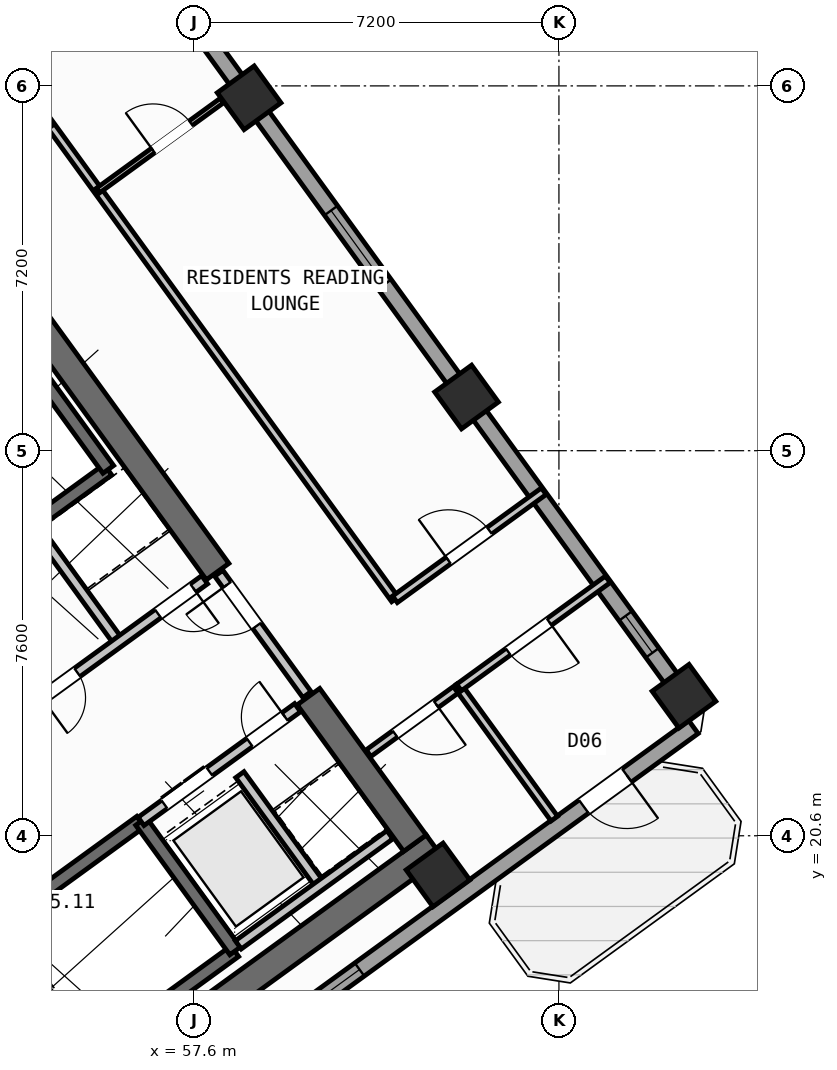
"""IFC4 building model, lengths in metres.
Left out: names, types, materials, properties, quantities, classifications, styles, units other than length and angle.
Written with IfcOpenShell. Run it as: python <this file> out.ifc"""

import sys

from ifc_helpers import new_model, si_unit, direction, frame, frame_2d, origin, origin_2d, place, context, subcontext, project, spatial, rectangle, hollow_rectangle, extrude, source, transform, mapped, element, fill, save


model = new_model("IFC4")
c1 = context("Model", 3, precision=1e-05, world=origin(), true_north=direction((0.0, 1.0)))
c2 = subcontext(c1, "Body", "Model", "MODEL_VIEW")
j1 = project(units=[si_unit("LENGTHUNIT", "METRE"), si_unit("PLANEANGLEUNIT", "RADIAN")], contexts=[c1])
p1 = place(None, origin())
s1 = spatial("IfcSite", under=j1, at=p1, CompositionType="ELEMENT")
p2 = place(p1, origin())
s2 = spatial("IfcBuilding", under=s1, at=p2, CompositionType="ELEMENT")
p3 = place(p2, frame((0.0, 0.0, 108.9)))
s3 = spatial("IfcBuildingStorey", under=s2, at=p3, CompositionType="ELEMENT", Elevation=108.9)
p4 = place(p3, frame((52.359, 13.14, 0.0), z_axis=(0.0, 0.0, 1.0), x_axis=(0.809014896919, 0.587788139183, 0.0)))
e1 = element("IfcWall", 1, at=p4, inside=s3, PredefinedType="SHEAR", context=c2, shape_type="SweptSolid", body=[
    extrude(rectangle(XDim=12.34, YDim=0.55, at=frame_2d((6.17, 0.0))), origin(), (0.0, 0.0, 1.0), 3.35),
])
p5 = place(p3, frame((61.958, 20.454, 0.0), z_axis=(0.0, 0.0, 1.0), x_axis=(-0.587802113096, 0.809004744015, 0.0)))
e2 = element("IfcWall", 2, at=p5, inside=s3, PredefinedType="SHEAR", context=c2, shape_type="SweptSolid", body=[
    extrude(rectangle(XDim=3.575, YDim=0.55, at=frame_2d((1.788, 0.0))), origin(), (0.0, 0.0, 1.0), 3.35),
])
p6 = place(p3, frame((58.064, 25.813, 0.0), z_axis=(0.0, 0.0, 1.0), x_axis=(-0.587764933797, 0.809031756236, 0.0)))
e3 = element("IfcWall", 3, at=p6, inside=s3, PredefinedType="SHEAR", context=c2, shape_type="SweptSolid", body=[
    extrude(rectangle(XDim=6.425, YDim=0.55, at=frame_2d((3.212, 0.0))), origin(), (0.0, 0.0, 1.0), 3.35),
])
m1 = source(origin(), c2, "Body", "SweptSolid", [
    extrude(hollow_rectangle(XDim=0.9, YDim=0.9, WallThickness=0.036, at=origin_2d()), origin(), (0.0, 0.0, 1.0), 3.6),
])
for number, where, z_axis, x_axis in (
    (4, (62.414, 19.827, 0.0), (0.0, 0.0, 1.0), (0.809, 0.588, 0.0)),
    (5, (67.268, 23.354, 0.0), (0.0, 0.0, 1.0), (0.809, 0.588, 0.0)),
    (6, (62.977, 29.259, 0.0), (0.0, 0.0, 1.0), (0.809, 0.588, 0.0)),
    (7, (58.686, 35.165, 0.0), (0.0, 0.0, 1.0), (0.809, 0.588, 0.0)),
):
    element("IfcColumn", number, at=place(p3, frame(where, z_axis=z_axis, x_axis=x_axis)), inside=s3, PredefinedType="COLUMN", context=c2, shape_type="MappedRepresentation", body=[
        mapped(m1, transform((0.0, 0.0, 0.0), scale=1.0)),
    ])
p7 = place(p3, frame((54.81, 40.5, 0.0), z_axis=(0.0, 0.0, 1.0), x_axis=(0.587783625747, -0.809018176127, 0.0)))
e8 = element("IfcWall", 8, at=p7, inside=s3, PredefinedType="STANDARD", context=c2, shape_type="SweptSolid", body=[
    extrude(rectangle(XDim=21.587, YDim=0.32, at=frame_2d((10.794, 0.0))), origin(), (0.0, 0.0, 1.0), 2.775),
])
p8 = place(p7, frame((2.381, 0.0, 0.8)))
e9 = element("IfcOpeningElement", 9, at=p8, cuts=e8, PredefinedType="OPENING", context=c2, shape_type="SweptSolid", body=[
    extrude(rectangle(XDim=2.1, YDim=1.55, at=frame_2d((1.05, 0.775))), frame((0.0, 0.17, 0.0), z_axis=(0.0, -1.0, 0.0), x_axis=(1.0, 0.0, 0.0)), (0.0, 0.0, 1.0), 0.34),
])
p9 = place(p7, frame((9.344, 0.0, 0.85)))
e10 = element("IfcOpeningElement", 10, at=p9, cuts=e8, PredefinedType="OPENING", context=c2, shape_type="SweptSolid", body=[
    extrude(rectangle(XDim=1.8, YDim=1.5, at=frame_2d((0.9, 0.75))), frame((0.0, 0.17, 0.0), z_axis=(0.0, -1.0, 0.0), x_axis=(1.0, 0.0, 0.0)), (0.0, 0.0, 1.0), 0.34),
])
p10 = place(p7, frame((19.234, 0.0, 1.0)))
e11 = element("IfcOpeningElement", 11, at=p10, cuts=e8, PredefinedType="OPENING", context=c2, shape_type="SweptSolid", body=[
    extrude(rectangle(XDim=0.9, YDim=1.25, at=frame_2d((0.45, 0.625))), frame((0.0, 0.17, 0.0), z_axis=(0.0, -1.0, 0.0), x_axis=(1.0, 0.0, 0.0)), (0.0, 0.0, 1.0), 0.34),
])
p11 = place(p3, frame((67.454, 22.747, 0.0), z_axis=(0.0, 0.0, 1.0), x_axis=(-0.809021120468, -0.587779573171, 0.0)))
e12 = element("IfcWall", 12, at=p11, inside=s3, PredefinedType="STANDARD", context=c2, shape_type="SweptSolid", body=[
    extrude(rectangle(XDim=17.588, YDim=0.32, at=frame_2d((8.794, 0.0))), origin(), (0.0, 0.0, 1.0), 3.35),
])
p12 = place(p11, frame((1.624, 0.0, 0.0)))
e13 = element("IfcOpeningElement", 13, at=p12, cuts=e12, PredefinedType="OPENING", context=c2, shape_type="SweptSolid", body=[
    extrude(rectangle(XDim=1.05, YDim=2.15, at=frame_2d((0.525, 1.075))), frame((0.0, 0.17, 0.0), z_axis=(0.0, -1.0, 0.0), x_axis=(1.0, 0.0, 0.0)), (0.0, 0.0, 1.0), 0.34),
])
p13 = place(p11, frame((8.144, 0.0, 0.8)))
e14 = element("IfcOpeningElement", 14, at=p13, cuts=e12, PredefinedType="OPENING", context=c2, shape_type="SweptSolid", body=[
    extrude(rectangle(XDim=2.1, YDim=1.55, at=frame_2d((1.05, 0.775))), frame((0.0, 0.17, 0.0), z_axis=(0.0, -1.0, 0.0), x_axis=(1.0, 0.0, 0.0)), (0.0, 0.0, 1.0), 0.34),
])
p14 = place(p11, frame((13.344, 0.0, 0.8)))
e15 = element("IfcOpeningElement", 15, at=p14, cuts=e12, PredefinedType="OPENING", context=c2, shape_type="SweptSolid", body=[
    extrude(rectangle(XDim=2.1, YDim=1.55, at=frame_2d((1.05, 0.775))), frame((0.0, 0.17, 0.0), z_axis=(0.0, -1.0, 0.0), x_axis=(1.0, 0.0, 0.0)), (0.0, 0.0, 1.0), 0.34),
])
p15 = place(p3, frame((49.863, 23.44, 0.0), z_axis=(0.0, 0.0, 1.0), x_axis=(0.809003474932, 0.587803859759, 0.0)))
e16 = element("IfcWall", 16, at=p15, inside=s3, PredefinedType="SHEAR", context=c2, shape_type="SweptSolid", body=[
    extrude(rectangle(XDim=7.46, YDim=0.26, at=frame_2d((3.73, 0.0))), origin(), (0.0, 0.0, 1.0), 3.35),
])
p16 = place(p15, frame((0.36, 0.0, 0.0)))
e17 = element("IfcOpeningElement", 17, at=p16, cuts=e16, PredefinedType="OPENING", context=c2, shape_type="SweptSolid", body=[
    extrude(rectangle(XDim=0.86, YDim=2.05, at=frame_2d((0.43, 1.025))), frame((0.0, 0.14, 0.0), z_axis=(0.0, -1.0, 0.0), x_axis=(1.0, 0.0, 0.0)), (0.0, 0.0, 1.0), 0.28),
])
p17 = place(p3, frame((55.906, 27.831, 0.0), z_axis=(0.0, 0.0, 1.0), x_axis=(-0.587804123638, 0.809003283204, 0.0)))
e18 = element("IfcWall", 18, at=p17, inside=s3, PredefinedType="SHEAR", context=c2, shape_type="SweptSolid", body=[
    extrude(rectangle(XDim=3.16, YDim=0.26, at=frame_2d((1.58, 0.0))), origin(), (0.0, 0.0, 1.0), 3.35),
])
p18 = place(p3, frame((52.472, 14.013, 0.0), z_axis=(0.0, 0.0, 1.0), x_axis=(0.809028366311, 0.587769599847, 0.0)))
e19 = element("IfcWall", 19, at=p18, inside=s3, PredefinedType="SHEAR", context=c2, shape_type="SweptSolid", body=[
    extrude(rectangle(XDim=7.33, YDim=0.26, at=frame_2d((3.665, 0.0))), origin(), (0.0, 0.0, 1.0), 3.35),
])
p19 = place(p3, frame((50.615, 16.57, 0.0), z_axis=(0.0, 0.0, 1.0), x_axis=(0.809028366311, 0.587769599847, 0.0)))
e20 = element("IfcWall", 20, at=p19, inside=s3, PredefinedType="SHEAR", context=c2, shape_type="SweptSolid", body=[
    extrude(rectangle(XDim=7.33, YDim=0.26, at=frame_2d((3.665, 0.0))), origin(), (0.0, 0.0, 1.0), 3.35),
])
p20 = place(p19, frame((0.22, 0.0, 0.0)))
e21 = element("IfcOpeningElement", 21, at=p20, cuts=e20, PredefinedType="OPENING", context=c2, shape_type="SweptSolid", body=[
    extrude(rectangle(XDim=1.1, YDim=2.1, at=frame_2d((0.55, 1.05))), frame((0.0, 0.14, 0.0), z_axis=(0.0, -1.0, 0.0), x_axis=(1.0, 0.0, 0.0)), (0.0, 0.0, 1.0), 0.28),
])
p21 = place(p3, frame((58.41, 18.327, 0.0), z_axis=(0.0, 0.0, 1.0), x_axis=(-0.58776738483, 0.809029975545, 0.0)))
e22 = element("IfcWall", 22, at=p21, inside=s3, PredefinedType="SHEAR", context=c2, shape_type="SweptSolid", body=[
    extrude(rectangle(XDim=3.16, YDim=0.26, at=frame_2d((1.58, 0.0))), origin(), (0.0, 0.0, 1.0), 3.35),
])
p22 = place(p3, frame((56.553, 20.884, 0.0), z_axis=(0.0, 0.0, 1.0), x_axis=(0.809023564264, 0.58777620951, 0.0)))
e23 = element("IfcWall", 23, at=p22, inside=s3, PredefinedType="STANDARD", context=c2, shape_type="SweptSolid", body=[
    extrude(rectangle(XDim=3.818, YDim=0.2, at=frame_2d((1.909, 0.0))), origin(), (0.0, 0.0, 1.0), 3.34),
])
p23 = place(p22, frame((0.57, 0.0, 0.0)))
e24 = element("IfcOpeningElement", 24, at=p23, cuts=e23, PredefinedType="OPENING", context=c2, shape_type="SweptSolid", body=[
    extrude(rectangle(XDim=1.1, YDim=2.15, at=frame_2d((0.55, 1.075))), frame((0.0, 0.11, 0.0), z_axis=(0.0, -1.0, 0.0), x_axis=(1.0, 0.0, 0.0)), (0.0, 0.0, 1.0), 0.22),
])
p24 = place(p22, frame((2.65, 0.0, 0.0)))
e25 = element("IfcOpeningElement", 25, at=p24, cuts=e23, PredefinedType="OPENING", context=c2, shape_type="SweptSolid", body=[
    extrude(rectangle(XDim=0.86, YDim=2.05, at=frame_2d((0.43, 1.025))), frame((0.0, 0.11, 0.0), z_axis=(0.0, -1.0, 0.0), x_axis=(1.0, 0.0, 0.0)), (0.0, 0.0, 1.0), 0.22),
])
p25 = place(p3, frame((60.067, 19.655, 0.0), z_axis=(0.0, 0.0, 1.0), x_axis=(-0.587800520745, 0.809005900975, 0.0)))
e26 = element("IfcWall", 26, at=p25, inside=s3, PredefinedType="STANDARD", context=c2, shape_type="SweptSolid", body=[
    extrude(rectangle(XDim=2.66, YDim=0.2, at=frame_2d((1.33, 0.0))), origin(), (0.0, 0.0, 1.0), 3.34),
])
p26 = place(p3, frame((58.472, 18.447, 0.0), z_axis=(0.0, 0.0, 1.0), x_axis=(0.809018631237, 0.587782999339, 0.0)))
e27 = element("IfcWall", 27, at=p26, inside=s3, PredefinedType="STANDARD", context=c2, shape_type="SweptSolid", body=[
    extrude(rectangle(XDim=3.698, YDim=0.2, at=frame_2d((1.849, 0.0))), origin(), (0.0, 0.0, 1.0), 3.34),
])
p27 = place(p3, frame((56.111, 24.419, 0.0), z_axis=(0.0, 0.0, 1.0), x_axis=(-0.58777848983, 0.809021907548, 0.0)))
e28 = element("IfcWall", 28, at=p27, inside=s3, PredefinedType="STANDARD", context=c2, shape_type="SweptSolid", body=[
    extrude(rectangle(XDim=2.88, YDim=0.2, at=frame_2d((1.44, 0.0))), origin(), (0.0, 0.0, 1.0), 3.34),
])
p28 = place(p3, frame((53.425, 22.468, 0.0), z_axis=(0.0, 0.0, 1.0), x_axis=(0.809024377198, 0.587775090574, 0.0)))
e29 = element("IfcWall", 29, at=p28, inside=s3, PredefinedType="STANDARD", context=c2, shape_type="SweptSolid", body=[
    extrude(rectangle(XDim=5.418, YDim=0.2, at=frame_2d((2.709, 0.0))), origin(), (0.0, 0.0, 1.0), 3.34),
])
p29 = place(p28, frame((4.28, 0.0, 0.0)))
e30 = element("IfcOpeningElement", 30, at=p29, cuts=e29, PredefinedType="OPENING", context=c2, shape_type="SweptSolid", body=[
    extrude(rectangle(XDim=0.86, YDim=2.05, at=frame_2d((0.43, 1.025))), frame((0.0, 0.11, 0.0), z_axis=(0.0, -1.0, 0.0), x_axis=(1.0, 0.0, 0.0)), (0.0, 0.0, 1.0), 0.22),
])
p30 = place(p28, frame((1.45, 0.0, 0.0)))
e31 = element("IfcOpeningElement", 31, at=p30, cuts=e29, PredefinedType="OPENING", context=c2, shape_type="SweptSolid", body=[
    extrude(rectangle(XDim=0.86, YDim=2.05, at=frame_2d((0.43, 1.025))), frame((0.0, 0.11, 0.0), z_axis=(0.0, -1.0, 0.0), x_axis=(1.0, 0.0, 0.0)), (0.0, 0.0, 1.0), 0.22),
])
p31 = place(p3, frame((59.827, 23.386, 0.0), z_axis=(0.0, 0.0, 1.0), x_axis=(-0.587803840107, 0.809003489211, 0.0)))
e32 = element("IfcWall", 32, at=p31, inside=s3, PredefinedType="STANDARD", context=c2, shape_type="SweptSolid", body=[
    extrude(rectangle(XDim=2.96, YDim=0.2, at=frame_2d((1.48, 0.0))), origin(), (0.0, 0.0, 1.0), 3.34),
])
p32 = place(p31, frame((1.68, 0.0, 0.0)))
e33 = element("IfcOpeningElement", 33, at=p32, cuts=e32, PredefinedType="OPENING", context=c2, shape_type="SweptSolid", body=[
    extrude(rectangle(XDim=1.0, YDim=2.1, at=frame_2d((0.5, 1.05))), frame((0.0, 0.11, 0.0), z_axis=(0.0, -1.0, 0.0), x_axis=(1.0, 0.0, 0.0)), (0.0, 0.0, 1.0), 0.22),
])
p33 = place(p3, frame((61.042, 22.229, 0.0), z_axis=(0.0, 0.0, 1.0), x_axis=(0.809075443949, 0.587704794942, 0.0)))
e34 = element("IfcWall", 34, at=p33, inside=s3, PredefinedType="PARTITIONING", context=c2, shape_type="SweptSolid", body=[
    extrude(rectangle(XDim=2.208, YDim=0.16, at=frame_2d((1.104, 0.0))), origin(), (0.0, 0.0, 1.0), 3.34),
])
p34 = place(p33, frame((0.648, 0.0, 0.0)))
e35 = element("IfcOpeningElement", 35, at=p34, cuts=e34, PredefinedType="OPENING", context=c2, shape_type="SweptSolid", body=[
    extrude(rectangle(XDim=1.0, YDim=2.1, at=frame_2d((0.5, 1.05))), frame((0.0, 0.09, 0.0), z_axis=(0.0, -1.0, 0.0), x_axis=(1.0, 0.0, 0.0)), (0.0, 0.0, 1.0), 0.18),
])
p35 = place(p3, frame((52.739, 33.143, 0.0), z_axis=(0.0, 0.0, 1.0), x_axis=(0.809000999347, 0.58780726693, 0.0)))
e36 = element("IfcWall", 36, at=p35, inside=s3, PredefinedType="PARTITIONING", context=c2, shape_type="SweptSolid", body=[
    extrude(rectangle(XDim=2.51, YDim=0.16, at=frame_2d((1.255, 0.0))), origin(), (0.0, 0.0, 1.0), 3.34),
])
p36 = place(p3, frame((64.709, 20.938, 0.0), z_axis=(0.0, 0.0, 1.0), x_axis=(-0.587772420479, 0.809026317077, 0.0)))
e37 = element("IfcWall", 37, at=p36, inside=s3, PredefinedType="PARTITIONING", context=c2, shape_type="SweptSolid", body=[
    extrude(rectangle(XDim=3.2, YDim=0.16, at=frame_2d((1.6, 0.0))), origin(), (0.0, 0.0, 1.0), 3.34),
])
p37 = place(p3, frame((61.564, 25.266, 0.0), z_axis=(0.0, 0.0, 1.0), x_axis=(-0.587784527444, 0.809017521007, 0.0)))
e38 = element("IfcWall", 38, at=p37, inside=s3, PredefinedType="PARTITIONING", context=c2, shape_type="SweptSolid", body=[
    extrude(rectangle(XDim=16.35, YDim=0.16, at=frame_2d((8.175, 0.0))), origin(), (0.0, 0.0, 1.0), 3.34),
])
p38 = place(p3, frame((62.828, 23.527, 0.0), z_axis=(0.0, 0.0, 1.0), x_axis=(0.809003564202, 0.587803736896, 0.0)))
e39 = element("IfcWall", 39, at=p38, inside=s3, PredefinedType="PARTITIONING", context=c2, shape_type="SweptSolid", body=[
    extrude(rectangle(XDim=3.63, YDim=0.16, at=frame_2d((1.815, 0.0))), origin(), (0.0, 0.0, 1.0), 3.34),
])
p39 = place(p38, frame((1.2, 0.0, 0.0)))
e40 = element("IfcOpeningElement", 40, at=p39, cuts=e39, PredefinedType="OPENING", context=c2, shape_type="SweptSolid", body=[
    extrude(rectangle(XDim=1.0, YDim=2.1, at=frame_2d((0.5, 1.05))), frame((0.0, 0.09, 0.0), z_axis=(0.0, -1.0, 0.0), x_axis=(1.0, 0.0, 0.0)), (0.0, 0.0, 1.0), 0.18),
])
p40 = place(p3, frame((61.564, 25.266, 0.0), z_axis=(0.0, 0.0, 1.0), x_axis=(0.809012309495, 0.587791700422, 0.0)))
e41 = element("IfcWall", 41, at=p40, inside=s3, PredefinedType="PARTITIONING", context=c2, shape_type="SweptSolid", body=[
    extrude(rectangle(XDim=3.63, YDim=0.16, at=frame_2d((1.815, 0.0))), origin(), (0.0, 0.0, 1.0), 3.34),
])
p41 = place(p40, frame((1.305, 0.0, 0.0)))
e42 = element("IfcOpeningElement", 42, at=p41, cuts=e41, PredefinedType="OPENING", context=c2, shape_type="SweptSolid", body=[
    extrude(rectangle(XDim=1.0, YDim=2.1, at=frame_2d((0.5, 1.05))), frame((0.0, 0.09, 0.0), z_axis=(0.0, -1.0, 0.0), x_axis=(1.0, 0.0, 0.0)), (0.0, 0.0, 1.0), 0.18),
])
p42 = place(p3, frame((55.703, 33.334, 0.0), z_axis=(0.0, 0.0, 1.0), x_axis=(0.809021891479, 0.587778511948, 0.0)))
e43 = element("IfcWall", 43, at=p42, inside=s3, PredefinedType="PARTITIONING", context=c2, shape_type="SweptSolid", body=[
    extrude(rectangle(XDim=3.028, YDim=0.11, at=frame_2d((1.514, 0.0))), origin(), (0.0, 0.0, 1.0), 2.775),
])
p43 = place(p42, frame((1.345, 0.0, 0.0)))
e44 = element("IfcOpeningElement", 44, at=p43, cuts=e43, PredefinedType="OPENING", context=c2, shape_type="SweptSolid", body=[
    extrude(rectangle(XDim=0.92, YDim=2.08, at=frame_2d((0.46, 1.04))), frame((0.0, 0.065, 0.0), z_axis=(0.0, -1.0, 0.0), x_axis=(1.0, 0.0, 0.0)), (0.0, 0.0, 1.0), 0.13),
])
m2 = source(origin(), c2, "Body", "SweptSolid", [
    extrude(rectangle(XDim=1.05, YDim=2.15, at=frame_2d((0.525, 1.075))), frame((0.0, 0.025, 0.0), z_axis=(0.0, -1.0, 0.0), x_axis=(1.0, 0.0, 0.0)), (0.0, 0.0, 1.0), 0.05),
])
p44 = place(p12, origin())
e45 = element("IfcDoor", 45, at=p44, inside=s3, OperationType="SINGLE_SWING_LEFT", PredefinedType="DOOR", context=c2, shape_type="MappedRepresentation", body=[
    mapped(m2, transform((0.0, 0.0, 0.0), scale=1.0)),
])
fill(e13, e45)
m3 = source(origin(), c2, "Body", "SweptSolid", [
    extrude(rectangle(XDim=1.8, YDim=1.5, at=frame_2d((0.9, 0.75))), frame((0.0, 0.03, 0.0), z_axis=(0.0, -1.0, 0.0), x_axis=(1.0, 0.0, 0.0)), (0.0, 0.0, 1.0), 0.06),
])
p45 = place(p9, origin())
e46 = element("IfcWindow", 46, at=p45, inside=s3, PartitioningType="SINGLE_PANEL", PredefinedType="WINDOW", context=c2, shape_type="MappedRepresentation", body=[
    mapped(m3, transform((0.0, 0.0, 0.0), scale=1.0)),
])
fill(e10, e46)
m4 = source(origin(), c2, "Body", "SweptSolid", [
    extrude(rectangle(XDim=0.9, YDim=1.25, at=frame_2d((0.45, 0.625))), frame((0.0, 0.03, 0.0), z_axis=(0.0, -1.0, 0.0), x_axis=(1.0, 0.0, 0.0)), (0.0, 0.0, 1.0), 0.06),
])
p46 = place(p10, origin())
e47 = element("IfcWindow", 47, at=p46, inside=s3, PartitioningType="SINGLE_PANEL", PredefinedType="WINDOW", context=c2, shape_type="MappedRepresentation", body=[
    mapped(m4, transform((0.0, 0.0, 0.0), scale=1.0)),
])
fill(e11, e47)
m5 = source(origin(), c2, "Body", "SweptSolid", [
    extrude(rectangle(XDim=2.1, YDim=1.55, at=frame_2d((1.05, 0.775))), frame((0.0, 0.03, 0.0), z_axis=(0.0, -1.0, 0.0), x_axis=(1.0, 0.0, 0.0)), (0.0, 0.0, 1.0), 0.06),
])
p47 = place(p13, origin())
e48 = element("IfcWindow", 48, at=p47, inside=s3, PartitioningType="SINGLE_PANEL", PredefinedType="WINDOW", context=c2, shape_type="MappedRepresentation", body=[
    mapped(m5, transform((0.0, 0.0, 0.0), scale=1.0)),
])
fill(e14, e48)
m6 = source(origin(), c2, "Body", "SweptSolid", [
    extrude(rectangle(XDim=1.1, YDim=2.15, at=frame_2d((0.55, 1.075))), frame((0.0, 0.025, 0.0), z_axis=(0.0, -1.0, 0.0), x_axis=(1.0, 0.0, 0.0)), (0.0, 0.0, 1.0), 0.05),
])
p48 = place(p23, origin())
e49 = element("IfcDoor", 49, at=p48, inside=s3, OperationType="DOUBLE_DOOR_SLIDING", PredefinedType="DOOR", context=c2, shape_type="MappedRepresentation", body=[
    mapped(m6, transform((0.0, 0.0, 0.0), scale=1.0)),
])
fill(e24, e49)
m7 = source(origin(), c2, "Body", "SweptSolid", [
    extrude(rectangle(XDim=0.86, YDim=2.05, at=frame_2d((0.43, 1.025))), frame((0.0, 0.025, 0.0), z_axis=(0.0, -1.0, 0.0), x_axis=(1.0, 0.0, 0.0)), (0.0, 0.0, 1.0), 0.05),
])
p49 = place(p24, origin())
e50 = element("IfcDoor", 50, at=p49, inside=s3, OperationType="SINGLE_SWING_RIGHT", PredefinedType="DOOR", context=c2, shape_type="MappedRepresentation", body=[
    mapped(m7, transform((0.0, 0.0, 0.0), scale=1.0)),
])
fill(e25, e50)
p50 = place(p29, frame((0.86, 0.0, 0.0), z_axis=(0.0, 0.0, 1.0), x_axis=(-1.0, 0.0, 0.0)))
e51 = element("IfcDoor", 51, at=p50, inside=s3, OperationType="SINGLE_SWING_LEFT", PredefinedType="DOOR", context=c2, shape_type="MappedRepresentation", body=[
    mapped(m7, transform((0.0, 0.0, 0.0), scale=1.0)),
])
fill(e30, e51)
p51 = place(p30, frame((0.86, 0.0, 0.0), z_axis=(0.0, 0.0, 1.0), x_axis=(-1.0, 0.0, 0.0)))
e52 = element("IfcDoor", 52, at=p51, inside=s3, OperationType="SINGLE_SWING_RIGHT", PredefinedType="DOOR", context=c2, shape_type="MappedRepresentation", body=[
    mapped(m7, transform((0.0, 0.0, 0.0), scale=1.0)),
])
fill(e31, e52)
m8 = source(origin(), c2, "Body", "SweptSolid", [
    extrude(rectangle(XDim=1.0, YDim=2.1, at=frame_2d((0.5, 1.05))), frame((0.0, 0.025, 0.0), z_axis=(0.0, -1.0, 0.0), x_axis=(1.0, 0.0, 0.0)), (0.0, 0.0, 1.0), 0.05),
])
p52 = place(p34, frame((1.0, 0.0, 0.0), z_axis=(0.0, 0.0, 1.0), x_axis=(-1.0, 0.0, 0.0)))
e53 = element("IfcDoor", 53, at=p52, inside=s3, OperationType="SINGLE_SWING_LEFT", PredefinedType="DOOR", context=c2, shape_type="MappedRepresentation", body=[
    mapped(m8, transform((0.0, 0.0, 0.0), scale=1.0)),
])
fill(e35, e53)
p53 = place(p32, origin())
e54 = element("IfcDoor", 54, at=p53, inside=s3, OperationType="SINGLE_SWING_RIGHT", PredefinedType="DOOR", context=c2, shape_type="MappedRepresentation", body=[
    mapped(m8, transform((0.0, 0.0, 0.0), scale=1.0)),
])
fill(e33, e54)
p54 = place(p41, origin())
e55 = element("IfcDoor", 55, at=p54, inside=s3, OperationType="SINGLE_SWING_LEFT", PredefinedType="DOOR", context=c2, shape_type="MappedRepresentation", body=[
    mapped(m8, transform((0.0, 0.0, 0.0), scale=1.0)),
])
fill(e42, e55)
m9 = source(origin(), c2, "Body", "SweptSolid", [
    extrude(rectangle(XDim=0.92, YDim=2.08, at=frame_2d((0.46, 1.04))), frame((0.0, 0.025, 0.0), z_axis=(0.0, -1.0, 0.0), x_axis=(1.0, 0.0, 0.0)), (0.0, 0.0, 1.0), 0.05),
])
p55 = place(p43, origin())
e56 = element("IfcDoor", 56, at=p55, inside=s3, OperationType="SINGLE_SWING_LEFT", PredefinedType="DOOR", context=c2, shape_type="MappedRepresentation", body=[
    mapped(m9, transform((0.0, 0.0, 0.0), scale=1.0)),
])
fill(e44, e56)
p56 = place(p39, frame((1.0, 0.0, 0.0), z_axis=(0.0, 0.0, 1.0), x_axis=(-1.0, 0.0, 0.0)))
e57 = element("IfcDoor", 57, at=p56, inside=s3, OperationType="SINGLE_SWING_LEFT", PredefinedType="DOOR", context=c2, shape_type="MappedRepresentation", body=[
    mapped(m8, transform((0.0, 0.0, 0.0), scale=1.0)),
])
fill(e40, e57)
save(model, sys.argv[1])
